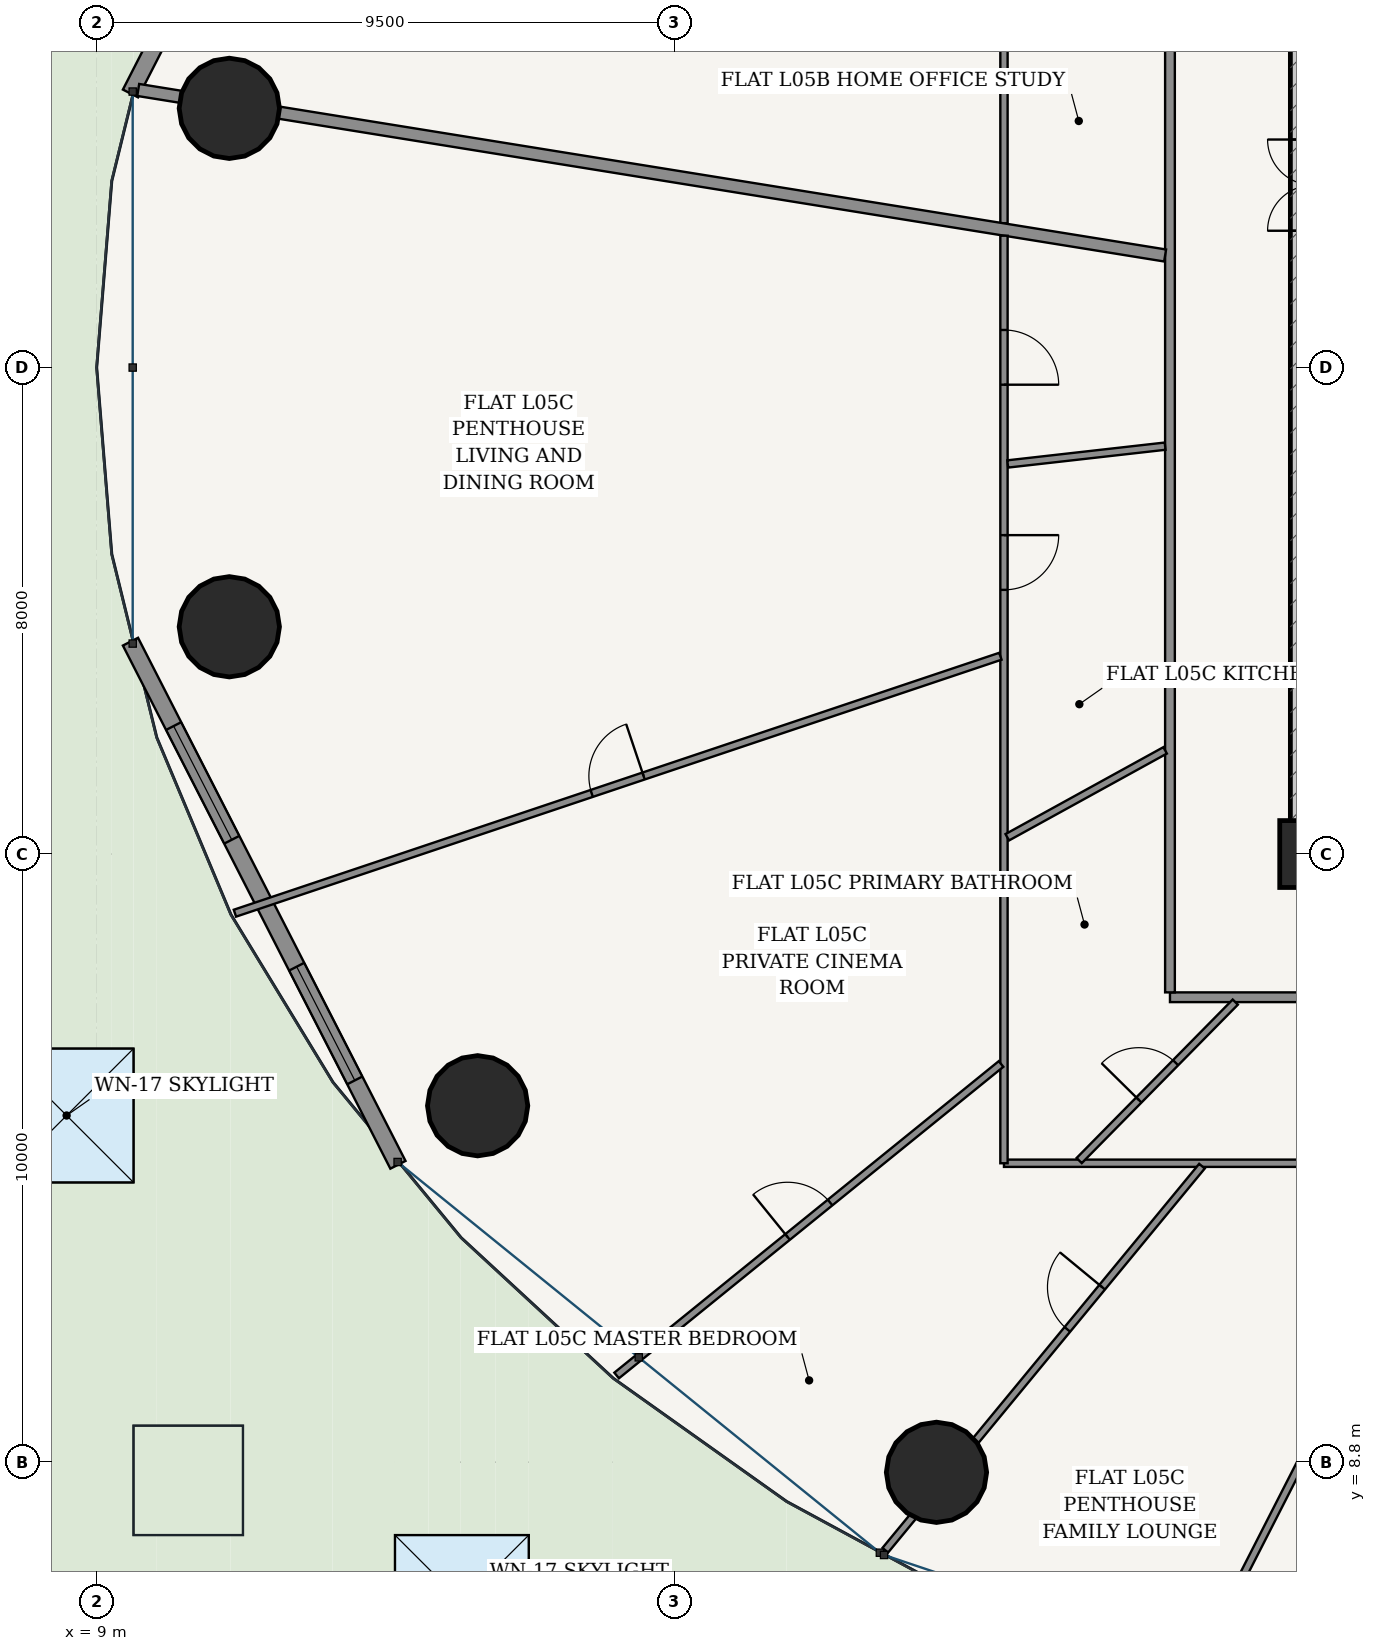
"""IFC4 building model, lengths in metres.
Left out: names, types, materials, properties, quantities, classifications, styles, units other than length and angle.
Written with IfcOpenShell. Run it as: python <this file> out.ifc"""

import sys

from ifc_helpers import new_model, si_unit, direction, frame, frame_2d, origin, origin_2d, place, context, subcontext, project, spatial, rectangle, hollow_circle, extrude, source, transform, mapped, element, fill, save


model = new_model("IFC4")
c1 = context("Model", 3, precision=1e-05, world=origin(), true_north=direction((-0.2419218956, 0.970295726276)))
c2 = subcontext(c1, "Body", "Model", "MODEL_VIEW")
j1 = project(units=[si_unit("LENGTHUNIT", "METRE"), si_unit("PLANEANGLEUNIT", "RADIAN")], contexts=[c1])
p1 = place(None, origin())
s1 = spatial("IfcSite", under=j1, at=p1, CompositionType="ELEMENT")
p2 = place(p1, origin())
s2 = spatial("IfcBuilding", under=s1, at=p2, CompositionType="ELEMENT")
p3 = place(p2, frame((0.0, 0.0, 24.0)))
s3 = spatial("IfcBuildingStorey", under=s2, at=p3, CompositionType="ELEMENT", Elevation=24.0)
p4 = place(p3, frame((29.0, 18.8, 0.0), z_axis=(0.0, 0.0, 1.0), x_axis=(1.0, 0.0, 0.0)))
e1 = element("IfcColumn", 1, at=p4, inside=s3, PredefinedType="COLUMN", context=c2, shape_type="SweptSolid", body=[
    extrude(rectangle(XDim=1.1, YDim=1.1, at=origin_2d()), origin(), (0.0, 0.0, 1.0), 3.6),
])
p5 = place(p3, frame((28.625, 18.8, 0.0), z_axis=(0.0, 0.0, 1.0), x_axis=(1.0, 0.0, 0.0)))
e2 = element("IfcWall", 2, at=p5, inside=s3, PredefinedType="SHEAR", context=c2, shape_type="SweptSolid", body=[
    extrude(rectangle(XDim=18.75, YDim=0.75, at=frame_2d((9.375, 0.0))), origin(), (0.0, 0.0, 1.0), 3.32),
])
p6 = place(p5, frame((8.95, 0.0, 0.0)))
e3 = element("IfcOpeningElement", 3, at=p6, cuts=e2, PredefinedType="OPENING", context=c2, shape_type="SweptSolid", body=[
    extrude(rectangle(XDim=0.85, YDim=2.1, at=frame_2d((0.425, 1.05))), frame((0.0, 0.385, 0.0), z_axis=(0.0, -1.0, 0.0), x_axis=(1.0, 0.0, 0.0)), (0.0, 0.0, 1.0), 0.77),
])
p7 = place(p3, frame((29.0, 19.175, 0.0), z_axis=(0.0, 0.0, 1.0), x_axis=(0.0, 1.0, 0.0)))
e4 = element("IfcWall", 4, at=p7, inside=s3, PredefinedType="SHEAR", context=c2, shape_type="SweptSolid", body=[
    extrude(rectangle(XDim=15.25, YDim=0.75, at=frame_2d((7.625, 0.0))), origin(), (0.0, 0.0, 1.0), 3.32),
])
p8 = place(p7, frame((9.875, 0.0, 0.0)))
e5 = element("IfcOpeningElement", 5, at=p8, cuts=e4, PredefinedType="OPENING", context=c2, shape_type="SweptSolid", body=[
    extrude(rectangle(XDim=1.5, YDim=2.2, at=frame_2d((0.75, 1.1))), frame((0.0, 0.385, 0.0), z_axis=(0.0, -1.0, 0.0), x_axis=(1.0, 0.0, 0.0)), (0.0, 0.0, 1.0), 0.77),
])
for number, where, z_axis, x_axis in (
    (6, (11.176, 31.063, 0.0), (0.0, 0.0, 1.0), (1.0, 0.0, 0.0)),
    (7, (11.176, 22.537, 0.0), (0.0, 0.0, 1.0), (1.0, 0.0, 0.0)),
    (8, (15.259, 14.661, 0.0), (0.0, 0.0, 1.0), (1.0, 0.0, 0.0)),
    (9, (22.805, 8.632, 0.0), (0.0, 0.0, 1.0), (1.0, 0.0, 0.0)),
):
    element("IfcColumn", number, at=place(p3, frame(where, z_axis=z_axis, x_axis=x_axis)), inside=s3, PredefinedType="COLUMN", context=c2, shape_type="SweptSolid", body=[
        extrude(hollow_circle(Radius=0.825, WallThickness=0.05, at=origin_2d()), origin(), (0.0, 0.0, 1.0), 3.6),
    ])
p9 = place(p3, frame((13.949, 39.91, 0.0), z_axis=(0.0, 0.0, 1.0), x_axis=(-0.45523081716, -0.890373462715, 0.0)))
e10 = element("IfcWall", 10, at=p9, inside=s3, PredefinedType="SOLIDWALL", context=c2, shape_type="SweptSolid", body=[
    extrude(rectangle(XDim=9.662, YDim=0.28, at=frame_2d((4.831, 0.0))), origin(), (0.0, 0.0, 1.0), 3.32),
])
p10 = place(p9, frame((4.156, 0.0, 0.0)))
e11 = element("IfcOpeningElement", 11, at=p10, cuts=e10, PredefinedType="OPENING", context=c2, shape_type="SweptSolid", body=[
    extrude(rectangle(XDim=1.35, YDim=2.2, at=frame_2d((0.675, 1.1))), frame((0.0, 0.15, 0.0), z_axis=(0.0, -1.0, 0.0), x_axis=(1.0, 0.0, 0.0)), (0.0, 0.0, 1.0), 0.3),
])
p11 = place(p3, frame((9.55, 22.292, 0.0), z_axis=(0.0, 0.0, 1.0), x_axis=(0.455220575541, -0.890378698984, 0.0)))
e12 = element("IfcWall", 12, at=p11, inside=s3, PredefinedType="SOLIDWALL", context=c2, shape_type="SweptSolid", body=[
    extrude(rectangle(XDim=9.662, YDim=0.28, at=frame_2d((4.831, 0.0))), origin(), (0.0, 0.0, 1.0), 3.32),
])
p12 = place(p11, frame((1.559, 0.0, 0.85)))
e13 = element("IfcOpeningElement", 13, at=p12, cuts=e12, PredefinedType="OPENING", context=c2, shape_type="SweptSolid", body=[
    extrude(rectangle(XDim=2.1, YDim=1.95, at=frame_2d((1.05, 0.975))), frame((0.0, 0.15, 0.0), z_axis=(0.0, -1.0, 0.0), x_axis=(1.0, 0.0, 0.0)), (0.0, 0.0, 1.0), 0.3),
])
p13 = place(p11, frame((6.003, 0.0, 0.85)))
e14 = element("IfcOpeningElement", 14, at=p13, cuts=e12, PredefinedType="OPENING", context=c2, shape_type="SweptSolid", body=[
    extrude(rectangle(XDim=2.1, YDim=1.95, at=frame_2d((1.05, 0.975))), frame((0.0, 0.15, 0.0), z_axis=(0.0, -1.0, 0.0), x_axis=(1.0, 0.0, 0.0)), (0.0, 0.0, 1.0), 0.3),
])
p14 = place(p3, frame((26.645, 16.445, 0.0), z_axis=(0.0, 0.0, 1.0), x_axis=(1.0, 0.0, 0.0)))
e15 = element("IfcWall", 15, at=p14, inside=s3, PredefinedType="PARTITIONING", context=c2, shape_type="SweptSolid", body=[
    extrude(rectangle(XDim=22.71, YDim=0.16, at=frame_2d((11.355, 0.0))), origin(), (0.0, 0.0, 1.0), 2.688),
])
p15 = place(p14, frame((4.421, 0.0, 0.0)))
e16 = element("IfcOpeningElement", 16, at=p15, cuts=e15, PredefinedType="OPENING", context=c2, shape_type="SweptSolid", body=[
    extrude(rectangle(XDim=0.98, YDim=2.2, at=frame_2d((0.49, 1.1))), frame((0.0, 0.09, 0.0), z_axis=(0.0, -1.0, 0.0), x_axis=(1.0, 0.0, 0.0)), (0.0, 0.0, 1.0), 0.18),
])
p16 = place(p14, frame((16.153, 0.0, 0.0)))
e17 = element("IfcOpeningElement", 17, at=p16, cuts=e15, PredefinedType="OPENING", context=c2, shape_type="SweptSolid", body=[
    extrude(rectangle(XDim=0.98, YDim=2.2, at=frame_2d((0.49, 1.1))), frame((0.0, 0.09, 0.0), z_axis=(0.0, -1.0, 0.0), x_axis=(1.0, 0.0, 0.0)), (0.0, 0.0, 1.0), 0.18),
])
p17 = place(p3, frame((26.645, 16.525, 0.0), z_axis=(0.0, 0.0, 1.0), x_axis=(0.0, 1.0, 0.0)))
e18 = element("IfcWall", 18, at=p17, inside=s3, PredefinedType="PARTITIONING", context=c2, shape_type="SweptSolid", body=[
    extrude(rectangle(XDim=20.55, YDim=0.16, at=frame_2d((10.275, 0.0))), origin(), (0.0, 0.0, 1.0), 2.688),
])
p18 = place(p3, frame((23.915, 29.172, 0.0), z_axis=(0.0, 0.0, 1.0), x_axis=(0.0, 1.0, 0.0)))
e19 = element("IfcWall", 19, at=p18, inside=s3, PredefinedType="PARTITIONING", context=c2, shape_type="SweptSolid", body=[
    extrude(rectangle(XDim=10.713, YDim=0.12, at=frame_2d((5.356, 0.0))), origin(), (0.0, 0.0, 1.0), 2.688),
])
p19 = place(p18, frame((3.666, 0.0, 0.0)))
e20 = element("IfcOpeningElement", 20, at=p19, cuts=e19, PredefinedType="OPENING", context=c2, shape_type="SweptSolid", body=[
    extrude(rectangle(XDim=0.9, YDim=2.15, at=frame_2d((0.45, 1.075))), frame((0.0, 0.07, 0.0), z_axis=(0.0, -1.0, 0.0), x_axis=(1.0, 0.0, 0.0)), (0.0, 0.0, 1.0), 0.14),
])
p20 = place(p3, frame((26.565, 28.643, 0.0), z_axis=(0.0, 0.0, 1.0), x_axis=(-0.987255953651, 0.159140447344, 0.0)))
e21 = element("IfcWall", 21, at=p20, inside=s3, PredefinedType="PARTITIONING", context=c2, shape_type="SweptSolid", body=[
    extrude(rectangle(XDim=17.105, YDim=0.2, at=frame_2d((8.553, 0.0))), origin(), (0.0, 0.0, 1.0), 2.688),
])
p21 = place(p3, frame((34.686, 13.715, 0.0), z_axis=(0.0, 0.0, 1.0), x_axis=(-1.0, 0.0, 0.0)))
e22 = element("IfcWall", 22, at=p21, inside=s3, PredefinedType="PARTITIONING", context=c2, shape_type="SweptSolid", body=[
    extrude(rectangle(XDim=10.771, YDim=0.12, at=frame_2d((5.385, 0.0))), origin(), (0.0, 0.0, 1.0), 2.688),
])
p22 = place(p21, frame((5.01, 0.0, 0.0)))
e23 = element("IfcOpeningElement", 23, at=p22, cuts=e22, PredefinedType="OPENING", context=c2, shape_type="SweptSolid", body=[
    extrude(rectangle(XDim=0.9, YDim=2.15, at=frame_2d((0.45, 1.075))), frame((0.0, 0.07, 0.0), z_axis=(0.0, -1.0, 0.0), x_axis=(1.0, 0.0, 0.0)), (0.0, 0.0, 1.0), 0.14),
])
p23 = place(p3, frame((23.915, 13.715, 0.0), z_axis=(0.0, 0.0, 1.0), x_axis=(0.0, 1.0, 0.0)))
e24 = element("IfcWall", 24, at=p23, inside=s3, PredefinedType="PARTITIONING", context=c2, shape_type="SweptSolid", body=[
    extrude(rectangle(XDim=15.253, YDim=0.12, at=frame_2d((7.626, 0.0))), origin(), (0.0, 0.0, 1.0), 2.688),
])
p24 = place(p23, frame((9.429, 0.0, 0.0)))
e25 = element("IfcOpeningElement", 25, at=p24, cuts=e24, PredefinedType="OPENING", context=c2, shape_type="SweptSolid", body=[
    extrude(rectangle(XDim=0.9, YDim=2.15, at=frame_2d((0.45, 1.075))), frame((0.0, 0.07, 0.0), z_axis=(0.0, -1.0, 0.0), x_axis=(1.0, 0.0, 0.0)), (0.0, 0.0, 1.0), 0.14),
])
p25 = place(p23, frame((12.803, 0.0, 0.0)))
e26 = element("IfcOpeningElement", 26, at=p25, cuts=e24, PredefinedType="OPENING", context=c2, shape_type="SweptSolid", body=[
    extrude(rectangle(XDim=0.9, YDim=2.15, at=frame_2d((0.45, 1.075))), frame((0.0, 0.07, 0.0), z_axis=(0.0, -1.0, 0.0), x_axis=(1.0, 0.0, 0.0)), (0.0, 0.0, 1.0), 0.14),
])
p26 = place(p3, frame((23.856, 22.052, 0.0), z_axis=(0.0, 0.0, 1.0), x_axis=(-0.948023034133, -0.318201707653, 0.0)))
e27 = element("IfcWall", 27, at=p26, inside=s3, PredefinedType="PARTITIONING", context=c2, shape_type="SweptSolid", body=[
    extrude(rectangle(XDim=13.279, YDim=0.12, at=frame_2d((6.639, 0.0))), origin(), (0.0, 0.0, 1.0), 2.762),
])
p27 = place(p26, frame((6.189, 0.0, 0.0)))
e28 = element("IfcOpeningElement", 28, at=p27, cuts=e27, PredefinedType="OPENING", context=c2, shape_type="SweptSolid", body=[
    extrude(rectangle(XDim=0.9, YDim=2.15, at=frame_2d((0.45, 1.075))), frame((0.0, 0.07, 0.0), z_axis=(0.0, -1.0, 0.0), x_axis=(1.0, 0.0, 0.0)), (0.0, 0.0, 1.0), 0.14),
])
p28 = place(p3, frame((23.867, 15.347, 0.0), z_axis=(0.0, 0.0, 1.0), x_axis=(-0.776936623447, -0.629578814087, 0.0)))
e29 = element("IfcWall", 29, at=p28, inside=s3, PredefinedType="PARTITIONING", context=c2, shape_type="SweptSolid", body=[
    extrude(rectangle(XDim=8.136, YDim=0.12, at=frame_2d((4.068, 0.0))), origin(), (0.0, 0.0, 1.0), 2.762),
])
p29 = place(p28, frame((3.618, 0.0, 0.0)))
e30 = element("IfcOpeningElement", 30, at=p29, cuts=e29, PredefinedType="OPENING", context=c2, shape_type="SweptSolid", body=[
    extrude(rectangle(XDim=0.9, YDim=2.15, at=frame_2d((0.45, 1.075))), frame((0.0, 0.07, 0.0), z_axis=(0.0, -1.0, 0.0), x_axis=(1.0, 0.0, 0.0)), (0.0, 0.0, 1.0), 0.14),
])
p30 = place(p3, frame((27.171, 13.667, 0.0), z_axis=(0.0, 0.0, 1.0), x_axis=(-0.636177533893, -0.771542704826, 0.0)))
e31 = element("IfcWall", 31, at=p30, inside=s3, PredefinedType="PARTITIONING", context=c2, shape_type="SweptSolid", body=[
    extrude(rectangle(XDim=8.187, YDim=0.12, at=frame_2d((4.093, 0.0))), origin(), (0.0, 0.0, 1.0), 2.688),
])
p31 = place(p30, frame((2.579, 0.0, 0.0)))
e32 = element("IfcOpeningElement", 32, at=p31, cuts=e31, PredefinedType="OPENING", context=c2, shape_type="SweptSolid", body=[
    extrude(rectangle(XDim=0.9, YDim=2.15, at=frame_2d((0.45, 1.075))), frame((0.0, 0.07, 0.0), z_axis=(0.0, -1.0, 0.0), x_axis=(1.0, 0.0, 0.0)), (0.0, 0.0, 1.0), 0.14),
])
p32 = place(p3, frame((31.283, 13.66, 0.0), z_axis=(0.0, 0.0, 1.0), x_axis=(-0.455131303234, -0.890424335256, 0.0)))
e33 = element("IfcWall", 33, at=p32, inside=s3, PredefinedType="PARTITIONING", context=c2, shape_type="SweptSolid", body=[
    extrude(rectangle(XDim=9.562, YDim=0.12, at=frame_2d((4.781, 0.0))), origin(), (0.0, 0.0, 1.0), 2.762),
])
p33 = place(p32, frame((4.331, 0.0, 0.0)))
e34 = element("IfcOpeningElement", 34, at=p33, cuts=e33, PredefinedType="OPENING", context=c2, shape_type="SweptSolid", body=[
    extrude(rectangle(XDim=0.9, YDim=2.15, at=frame_2d((0.45, 1.075))), frame((0.0, 0.07, 0.0), z_axis=(0.0, -1.0, 0.0), x_axis=(1.0, 0.0, 0.0)), (0.0, 0.0, 1.0), 0.14),
])
p34 = place(p3, frame((26.565, 25.507, 0.0), z_axis=(0.0, 0.0, 1.0), x_axis=(-0.993676271227, -0.112282981789, 0.0)))
e35 = element("IfcWall", 35, at=p34, inside=s3, PredefinedType="PARTITIONING", context=c2, shape_type="SweptSolid", body=[
    extrude(rectangle(XDim=2.605, YDim=0.12, at=frame_2d((1.302, 0.0))), origin(), (0.0, 0.0, 1.0), 3.32),
])
p35 = place(p3, frame((26.565, 20.505, 0.0), z_axis=(0.0, 0.0, 1.0), x_axis=(-0.876027961584, -0.482260314066, 0.0)))
e36 = element("IfcWall", 36, at=p35, inside=s3, PredefinedType="PARTITIONING", context=c2, shape_type="SweptSolid", body=[
    extrude(rectangle(XDim=2.963, YDim=0.12, at=frame_2d((1.481, 0.0))), origin(), (0.0, 0.0, 1.0), 2.688),
])
p36 = place(p3, frame((27.719, 16.365, 0.0), z_axis=(0.0, 0.0, 1.0), x_axis=(-0.701848204267, -0.712326539002, 0.0)))
e37 = element("IfcWall", 37, at=p36, inside=s3, PredefinedType="PARTITIONING", context=c2, shape_type="SweptSolid", body=[
    extrude(rectangle(XDim=3.658, YDim=0.12, at=frame_2d((1.829, 0.0))), origin(), (0.0, 0.0, 1.0), 2.688),
])
p37 = place(p36, frame((1.399, 0.0, 0.0)))
e38 = element("IfcOpeningElement", 38, at=p37, cuts=e37, PredefinedType="OPENING", context=c2, shape_type="SweptSolid", body=[
    extrude(rectangle(XDim=0.86, YDim=2.15, at=frame_2d((0.43, 1.075))), frame((0.0, 0.07, 0.0), z_axis=(0.0, -1.0, 0.0), x_axis=(1.0, 0.0, 0.0)), (0.0, 0.0, 1.0), 0.14),
])
m1 = source(origin(), c2, "Body", "SweptSolid", [
    extrude(rectangle(XDim=2.1, YDim=1.95, at=frame_2d((1.05, 0.975))), frame((0.0, 0.03, 0.0), z_axis=(0.0, -1.0, 0.0), x_axis=(1.0, 0.0, 0.0)), (0.0, 0.0, 1.0), 0.06),
])
p38 = place(p12, origin())
e39 = element("IfcWindow", 39, at=p38, inside=s3, PartitioningType="SINGLE_PANEL", PredefinedType="WINDOW", context=c2, shape_type="MappedRepresentation", body=[
    mapped(m1, transform((0.0, 0.0, 0.0), scale=1.0)),
])
fill(e13, e39)
p39 = place(p13, origin())
e40 = element("IfcWindow", 40, at=p39, inside=s3, PartitioningType="SINGLE_PANEL", PredefinedType="WINDOW", context=c2, shape_type="MappedRepresentation", body=[
    mapped(m1, transform((0.0, 0.0, 0.0), scale=1.0)),
])
fill(e14, e40)
p40 = place(p3, frame((0.0, 0.0, -0.3)))
p41 = place(p40, frame((8.5, 14.5, 0.0)))
p42 = place(p41, frame((0.0, 0.0, 0.26)))
e41 = element("IfcWindow", 41, at=p42, inside=s3, PartitioningType="SINGLE_PANEL", PredefinedType="SKYLIGHT", context=c2, shape_type="SweptSolid", body=[
    extrude(rectangle(XDim=2.2, YDim=2.2, at=origin_2d()), origin(), (0.0, 0.0, 1.0), 0.04),
])
p43 = place(p40, frame((15.0, 6.5, 0.0)))
p44 = place(p43, frame((0.0, 0.0, 0.26)))
e42 = element("IfcWindow", 42, at=p44, inside=s3, PartitioningType="SINGLE_PANEL", PredefinedType="SKYLIGHT", context=c2, shape_type="SweptSolid", body=[
    extrude(rectangle(XDim=2.2, YDim=2.2, at=origin_2d()), origin(), (0.0, 0.0, 1.0), 0.04),
])
m2 = source(origin(), c2, "Body", "SweptSolid", [
    extrude(rectangle(XDim=0.86, YDim=2.15, at=frame_2d((0.43, 1.075))), frame((0.0, 0.025, 0.0), z_axis=(0.0, -1.0, 0.0), x_axis=(1.0, 0.0, 0.0)), (0.0, 0.0, 1.0), 0.05),
])
p45 = place(p37, frame((0.86, 0.0, 0.0), z_axis=(0.0, 0.0, 1.0), x_axis=(-1.0, 0.0, 0.0)))
e43 = element("IfcDoor", 43, at=p45, inside=s3, OperationType="SINGLE_SWING_LEFT", PredefinedType="DOOR", context=c2, shape_type="MappedRepresentation", body=[
    mapped(m2, transform((0.0, 0.0, 0.0), scale=1.0)),
])
fill(e38, e43)
m3 = source(origin(), c2, "Body", "SweptSolid", [
    extrude(rectangle(XDim=0.9, YDim=2.15, at=frame_2d((0.45, 1.075))), frame((0.0, 0.025, 0.0), z_axis=(0.0, -1.0, 0.0), x_axis=(1.0, 0.0, 0.0)), (0.0, 0.0, 1.0), 0.05),
])
p46 = place(p31, frame((0.9, 0.0, 0.0), z_axis=(0.0, 0.0, 1.0), x_axis=(-1.0, 0.0, 0.0)))
e44 = element("IfcDoor", 44, at=p46, inside=s3, OperationType="SINGLE_SWING_RIGHT", PredefinedType="DOOR", context=c2, shape_type="MappedRepresentation", body=[
    mapped(m3, transform((0.0, 0.0, 0.0), scale=1.0)),
])
fill(e32, e44)
p47 = place(p29, frame((0.9, 0.0, 0.0), z_axis=(0.0, 0.0, 1.0), x_axis=(-1.0, 0.0, 0.0)))
e45 = element("IfcDoor", 45, at=p47, inside=s3, OperationType="SINGLE_SWING_LEFT", PredefinedType="DOOR", context=c2, shape_type="MappedRepresentation", body=[
    mapped(m3, transform((0.0, 0.0, 0.0), scale=1.0)),
])
fill(e30, e45)
p48 = place(p27, frame((0.9, 0.0, 0.0), z_axis=(0.0, 0.0, 1.0), x_axis=(-1.0, 0.0, 0.0)))
e46 = element("IfcDoor", 46, at=p48, inside=s3, OperationType="SINGLE_SWING_RIGHT", PredefinedType="DOOR", context=c2, shape_type="MappedRepresentation", body=[
    mapped(m3, transform((0.0, 0.0, 0.0), scale=1.0)),
])
fill(e28, e46)
p49 = place(p24, frame((0.9, 0.0, 0.0), z_axis=(0.0, 0.0, 1.0), x_axis=(-1.0, 0.0, 0.0)))
e47 = element("IfcDoor", 47, at=p49, inside=s3, OperationType="SINGLE_SWING_LEFT", PredefinedType="DOOR", context=c2, shape_type="MappedRepresentation", body=[
    mapped(m3, transform((0.0, 0.0, 0.0), scale=1.0)),
])
fill(e25, e47)
p50 = place(p25, frame((0.9, 0.0, 0.0), z_axis=(0.0, 0.0, 1.0), x_axis=(-1.0, 0.0, 0.0)))
e48 = element("IfcDoor", 48, at=p50, inside=s3, OperationType="SINGLE_SWING_RIGHT", PredefinedType="DOOR", context=c2, shape_type="MappedRepresentation", body=[
    mapped(m3, transform((0.0, 0.0, 0.0), scale=1.0)),
])
fill(e26, e48)
save(model, sys.argv[1])
